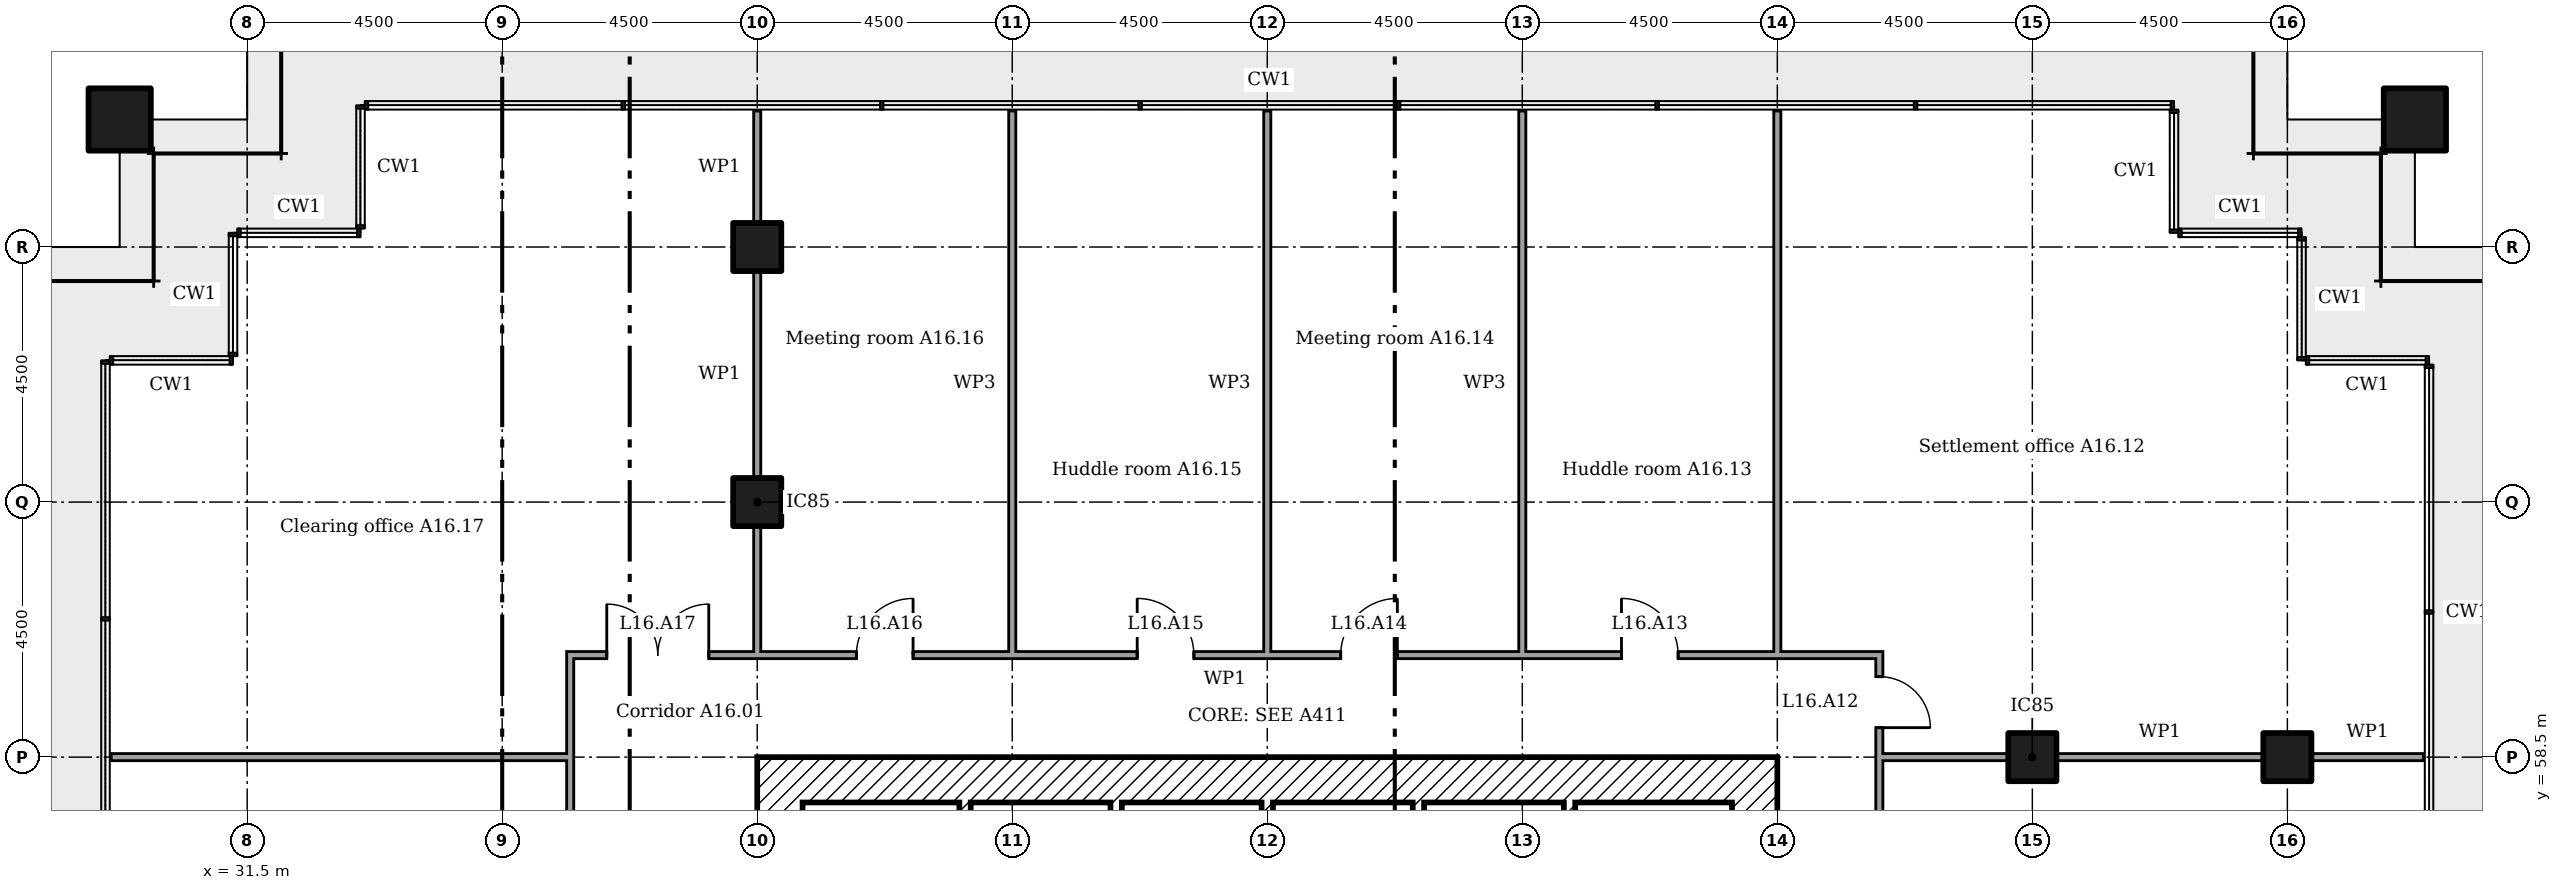
"""IFC4 building model, lengths in metres.
Left out: names, types, materials, properties, quantities, classifications, styles, units other than length and angle.
Written with IfcOpenShell. Run it as: python <this file> out.ifc"""

import sys

from ifc_helpers import new_model, si_unit, direction, frame, frame_2d, origin, origin_2d, place, context, subcontext, project, spatial, rectangle, extrude, element, fill, save


model = new_model("IFC4")
c1 = context("Model", 3, precision=1e-05, world=origin(), true_north=direction((0.0, 1.0)))
c2 = subcontext(c1, "Body", "Model", "MODEL_VIEW")
j1 = project(units=[si_unit("LENGTHUNIT", "METRE"), si_unit("PLANEANGLEUNIT", "RADIAN")], contexts=[c1])
p1 = place(None, origin())
s1 = spatial("IfcSite", under=j1, at=p1, CompositionType="ELEMENT")
p2 = place(p1, origin())
s2 = spatial("IfcBuilding", under=s1, at=p2, CompositionType="ELEMENT")
p3 = place(p2, frame((0.0, 0.0, 69.0)))
s3 = spatial("IfcBuildingStorey", under=s2, at=p3, CompositionType="ELEMENT", Elevation=69.0)
for number, where in (
    (1, (69.75, 69.75, 0.0)),
    (2, (29.25, 69.75, 0.0)),
):
    element("IfcColumn", number, at=place(p3, frame(where)), inside=s3, PredefinedType="COLUMN", context=c2, shape_type="SweptSolid", body=[
        extrude(rectangle(XDim=1.1, YDim=1.1, at=origin_2d()), origin(), (0.0, 0.0, 1.0), 3.6),
    ])
for number, where in (
    (3, (40.5, 63.0, 0.0)),
    (4, (40.5, 67.5, 0.0)),
    (5, (63.0, 58.5, 0.0)),
    (6, (67.5, 58.5, 0.0)),
):
    element("IfcColumn", number, at=place(p3, frame(where)), inside=s3, PredefinedType="COLUMN", context=c2, shape_type="SweptSolid", body=[
        extrude(rectangle(XDim=0.85, YDim=0.85, at=origin_2d()), origin(), (0.0, 0.0, 1.0), 3.6),
    ])
p4 = place(p3, frame((58.1, 40.5, 0.0), z_axis=(0.0, 0.0, 1.0), x_axis=(0.0, 1.0, 0.0)))
e7 = element("IfcWall", 7, at=p4, inside=s3, PredefinedType="SHEAR", context=c2, shape_type="SweptSolid", body=[
    extrude(rectangle(XDim=18.0, YDim=0.8, at=frame_2d((9.0, 0.0))), origin(), (0.0, 0.0, 1.0), 3.35),
])
p5 = place(p4, frame((13.15, 0.0, 0.0)))
e8 = element("IfcOpeningElement", 8, at=p5, cuts=e7, PredefinedType="OPENING", context=c2, shape_type="SweptSolid", body=[
    extrude(rectangle(XDim=1.2, YDim=2.1, at=frame_2d((0.6, 1.05))), frame((0.0, 0.41, 0.0), z_axis=(0.0, -1.0, 0.0), x_axis=(1.0, 0.0, 0.0)), (0.0, 0.0, 1.0), 0.82),
])
p6 = place(p4, frame((3.9, 0.0, 0.0)))
e9 = element("IfcOpeningElement", 9, at=p6, cuts=e7, PredefinedType="OPENING", context=c2, shape_type="SweptSolid", body=[
    extrude(rectangle(XDim=1.8, YDim=2.1, at=frame_2d((0.9, 1.05))), frame((0.0, 0.41, 0.0), z_axis=(0.0, -1.0, 0.0), x_axis=(1.0, 0.0, 0.0)), (0.0, 0.0, 1.0), 0.82),
])
p7 = place(p4, frame((11.525, 0.0, 0.0)))
e10 = element("IfcOpeningElement", 10, at=p7, cuts=e7, PredefinedType="OPENING", context=c2, shape_type="SweptSolid", body=[
    extrude(rectangle(XDim=1.0, YDim=2.1, at=frame_2d((0.5, 1.05))), frame((0.0, 0.41, 0.0), z_axis=(0.0, -1.0, 0.0), x_axis=(1.0, 0.0, 0.0)), (0.0, 0.0, 1.0), 0.82),
])
p8 = place(p3, frame((41.3, 58.1, 0.0)))
e11 = element("IfcWall", 11, at=p8, inside=s3, PredefinedType="SHEAR", context=c2, shape_type="SweptSolid", body=[
    extrude(rectangle(XDim=16.4, YDim=0.8, at=frame_2d((8.2, 0.0))), origin(), (0.0, 0.0, 1.0), 3.35),
])
p9 = place(p3, frame((40.9, 40.5, 0.0), z_axis=(0.0, 0.0, 1.0), x_axis=(0.0, 1.0, 0.0)))
e12 = element("IfcWall", 12, at=p9, inside=s3, PredefinedType="SHEAR", context=c2, shape_type="SweptSolid", body=[
    extrude(rectangle(XDim=18.0, YDim=0.8, at=frame_2d((9.0, 0.0))), origin(), (0.0, 0.0, 1.0), 3.35),
])
p10 = place(p9, frame((3.65, 0.0, 0.0)))
e13 = element("IfcOpeningElement", 13, at=p10, cuts=e12, PredefinedType="OPENING", context=c2, shape_type="SweptSolid", body=[
    extrude(rectangle(XDim=1.2, YDim=2.1, at=frame_2d((0.6, 1.05))), frame((0.0, 0.41, 0.0), z_axis=(0.0, -1.0, 0.0), x_axis=(1.0, 0.0, 0.0)), (0.0, 0.0, 1.0), 0.82),
])
p11 = place(p9, frame((5.475, 0.0, 0.0)))
e14 = element("IfcOpeningElement", 14, at=p11, cuts=e12, PredefinedType="OPENING", context=c2, shape_type="SweptSolid", body=[
    extrude(rectangle(XDim=1.0, YDim=2.1, at=frame_2d((0.5, 1.05))), frame((0.0, 0.41, 0.0), z_axis=(0.0, -1.0, 0.0), x_axis=(1.0, 0.0, 0.0)), (0.0, 0.0, 1.0), 0.82),
])
p12 = place(p9, frame((12.3, 0.0, 0.0)))
e15 = element("IfcOpeningElement", 15, at=p12, cuts=e12, PredefinedType="OPENING", context=c2, shape_type="SweptSolid", body=[
    extrude(rectangle(XDim=1.0, YDim=2.1, at=frame_2d((0.5, 1.05))), frame((0.0, 0.41, 0.0), z_axis=(0.0, -1.0, 0.0), x_axis=(1.0, 0.0, 0.0)), (0.0, 0.0, 1.0), 0.82),
])
p13 = place(p3, frame((44.167, 57.7, 0.0), z_axis=(0.0, 0.0, 1.0), x_axis=(0.0, -1.0, 0.0)))
e16 = element("IfcWall", 16, at=p13, inside=s3, PredefinedType="SHEAR", context=c2, shape_type="SweptSolid", body=[
    extrude(rectangle(XDim=3.3, YDim=0.2, at=frame_2d((1.65, 0.0))), origin(), (0.0, 0.0, 1.0), 3.35),
])
p14 = place(p3, frame((46.833, 57.7, 0.0), z_axis=(0.0, 0.0, 1.0), x_axis=(0.0, -1.0, 0.0)))
e17 = element("IfcWall", 17, at=p14, inside=s3, PredefinedType="SHEAR", context=c2, shape_type="SweptSolid", body=[
    extrude(rectangle(XDim=4.4, YDim=0.2, at=frame_2d((2.2, 0.0))), origin(), (0.0, 0.0, 1.0), 3.35),
])
for number, where, z_axis, x_axis in (
    (18, (49.5, 57.7, 0.0), (0.0, 0.0, 1.0), (0.0, -1.0, 0.0)),
    (19, (52.167, 57.7, 0.0), (0.0, 0.0, 1.0), (0.0, -1.0, 0.0)),
    (20, (54.833, 57.7, 0.0), (0.0, 0.0, 1.0), (0.0, -1.0, 0.0)),
):
    element("IfcWall", number, at=place(p3, frame(where, z_axis=z_axis, x_axis=x_axis)), inside=s3, PredefinedType="SHEAR", context=c2, shape_type="SweptSolid", body=[
        extrude(rectangle(XDim=2.5, YDim=0.2, at=frame_2d((1.25, 0.0))), origin(), (0.0, 0.0, 1.0), 3.35),
    ])
p15 = place(p3, frame((29.1, 58.5, 0.0)))
e21 = element("IfcWall", 21, at=p15, inside=s3, PredefinedType="PARTITIONING", context=c2, shape_type="SweptSolid", body=[
    extrude(rectangle(XDim=8.1, YDim=0.125, at=frame_2d((4.05, 0.0))), origin(), (0.0, 0.0, 1.0), 2.766),
])
p16 = place(p3, frame((60.3, 58.5, 0.0)))
e22 = element("IfcWall", 22, at=p16, inside=s3, PredefinedType="PARTITIONING", context=c2, shape_type="SweptSolid", body=[
    extrude(rectangle(XDim=2.275, YDim=0.125, at=frame_2d((1.137, 0.0))), origin(), (0.0, 0.0, 1.0), 2.676),
])
p17 = place(p3, frame((63.425, 58.5, 0.0)))
e23 = element("IfcWall", 23, at=p17, inside=s3, PredefinedType="PARTITIONING", context=c2, shape_type="SweptSolid", body=[
    extrude(rectangle(XDim=3.65, YDim=0.125, at=frame_2d((1.825, 0.0))), origin(), (0.0, 0.0, 1.0), 2.676),
])
p18 = place(p3, frame((67.925, 58.5, 0.0)))
e24 = element("IfcWall", 24, at=p18, inside=s3, PredefinedType="PARTITIONING", context=c2, shape_type="SweptSolid", body=[
    extrude(rectangle(XDim=1.975, YDim=0.125, at=frame_2d((0.987, 0.0))), origin(), (0.0, 0.0, 1.0), 2.676),
])
p19 = place(p3, frame((37.137, 60.3, 0.0)))
e25 = element("IfcWall", 25, at=p19, inside=s3, PredefinedType="PARTITIONING", context=c2, shape_type="SweptSolid", body=[
    extrude(rectangle(XDim=23.225, YDim=0.125, at=frame_2d((11.613, 0.0))), origin(), (0.0, 0.0, 1.0), 3.45),
])
p20 = place(p19, frame((18.613, 0.0, 0.0)))
e26 = element("IfcOpeningElement", 26, at=p20, cuts=e25, PredefinedType="OPENING", context=c2, shape_type="SweptSolid", body=[
    extrude(rectangle(XDim=1.0, YDim=2.1, at=frame_2d((0.5, 1.05))), frame((0.0, 0.073, 0.0), z_axis=(0.0, -1.0, 0.0), x_axis=(1.0, 0.0, 0.0)), (0.0, 0.0, 1.0), 0.145),
])
p21 = place(p19, frame((13.657, 0.0, 0.0)))
e27 = element("IfcOpeningElement", 27, at=p21, cuts=e25, PredefinedType="OPENING", context=c2, shape_type="SweptSolid", body=[
    extrude(rectangle(XDim=1.0, YDim=2.1, at=frame_2d((0.5, 1.05))), frame((0.0, 0.073, 0.0), z_axis=(0.0, -1.0, 0.0), x_axis=(1.0, 0.0, 0.0)), (0.0, 0.0, 1.0), 0.145),
])
p22 = place(p19, frame((10.067, 0.0, 0.0)))
e28 = element("IfcOpeningElement", 28, at=p22, cuts=e25, PredefinedType="OPENING", context=c2, shape_type="SweptSolid", body=[
    extrude(rectangle(XDim=1.0, YDim=2.1, at=frame_2d((0.5, 1.05))), frame((0.0, 0.073, 0.0), z_axis=(0.0, -1.0, 0.0), x_axis=(1.0, 0.0, 0.0)), (0.0, 0.0, 1.0), 0.145),
])
p23 = place(p19, frame((5.113, 0.0, 0.0)))
e29 = element("IfcOpeningElement", 29, at=p23, cuts=e25, PredefinedType="OPENING", context=c2, shape_type="SweptSolid", body=[
    extrude(rectangle(XDim=1.0, YDim=2.1, at=frame_2d((0.5, 1.05))), frame((0.0, 0.073, 0.0), z_axis=(0.0, -1.0, 0.0), x_axis=(1.0, 0.0, 0.0)), (0.0, 0.0, 1.0), 0.145),
])
p24 = place(p19, frame((0.708, 0.0, 0.0)))
e30 = element("IfcOpeningElement", 30, at=p24, cuts=e25, PredefinedType="OPENING", context=c2, shape_type="SweptSolid", body=[
    extrude(rectangle(XDim=1.8, YDim=2.1, at=frame_2d((0.9, 1.05))), frame((0.0, 0.073, 0.0), z_axis=(0.0, -1.0, 0.0), x_axis=(1.0, 0.0, 0.0)), (0.0, 0.0, 1.0), 0.145),
])
p25 = place(p3, frame((37.2, 38.762, 0.0), z_axis=(0.0, 0.0, 1.0), x_axis=(0.0, 1.0, 0.0)))
e31 = element("IfcWall", 31, at=p25, inside=s3, PredefinedType="PARTITIONING", context=c2, shape_type="SweptSolid", body=[
    extrude(rectangle(XDim=21.475, YDim=0.125, at=frame_2d((10.738, 0.0))), origin(), (0.0, 0.0, 1.0), 3.45),
])
p26 = place(p25, frame((7.988, 0.0, 0.0)))
e32 = element("IfcOpeningElement", 32, at=p26, cuts=e31, PredefinedType="OPENING", context=c2, shape_type="SweptSolid", body=[
    extrude(rectangle(XDim=1.0, YDim=2.1, at=frame_2d((0.5, 1.05))), frame((0.0, 0.073, 0.0), z_axis=(0.0, -1.0, 0.0), x_axis=(1.0, 0.0, 0.0)), (0.0, 0.0, 1.0), 0.145),
])
p27 = place(p25, frame((3.032, 0.0, 0.0)))
e33 = element("IfcOpeningElement", 33, at=p27, cuts=e31, PredefinedType="OPENING", context=c2, shape_type="SweptSolid", body=[
    extrude(rectangle(XDim=1.0, YDim=2.1, at=frame_2d((0.5, 1.05))), frame((0.0, 0.073, 0.0), z_axis=(0.0, -1.0, 0.0), x_axis=(1.0, 0.0, 0.0)), (0.0, 0.0, 1.0), 0.145),
])
p28 = place(p25, frame((17.442, 0.0, 0.0)))
e34 = element("IfcOpeningElement", 34, at=p28, cuts=e31, PredefinedType="OPENING", context=c2, shape_type="SweptSolid", body=[
    extrude(rectangle(XDim=1.0, YDim=2.1, at=frame_2d((0.5, 1.05))), frame((0.0, 0.073, 0.0), z_axis=(0.0, -1.0, 0.0), x_axis=(1.0, 0.0, 0.0)), (0.0, 0.0, 1.0), 0.145),
])
p29 = place(p25, frame((12.488, 0.0, 0.0)))
e35 = element("IfcOpeningElement", 35, at=p29, cuts=e31, PredefinedType="OPENING", context=c2, shape_type="SweptSolid", body=[
    extrude(rectangle(XDim=1.0, YDim=2.1, at=frame_2d((0.5, 1.05))), frame((0.0, 0.073, 0.0), z_axis=(0.0, -1.0, 0.0), x_axis=(1.0, 0.0, 0.0)), (0.0, 0.0, 1.0), 0.145),
])
p30 = place(p3, frame((40.5, 60.3, 0.0), z_axis=(0.0, 0.0, 1.0), x_axis=(0.0, 1.0, 0.0)))
e36 = element("IfcWall", 36, at=p30, inside=s3, PredefinedType="PARTITIONING", context=c2, shape_type="SweptSolid", body=[
    extrude(rectangle(XDim=2.275, YDim=0.125, at=frame_2d((1.137, 0.0))), origin(), (0.0, 0.0, 1.0), 2.676),
])
p31 = place(p3, frame((40.5, 63.425, 0.0), z_axis=(0.0, 0.0, 1.0), x_axis=(0.0, 1.0, 0.0)))
e37 = element("IfcWall", 37, at=p31, inside=s3, PredefinedType="PARTITIONING", context=c2, shape_type="SweptSolid", body=[
    extrude(rectangle(XDim=3.65, YDim=0.125, at=frame_2d((1.825, 0.0))), origin(), (0.0, 0.0, 1.0), 2.676),
])
p32 = place(p3, frame((40.5, 67.925, 0.0), z_axis=(0.0, 0.0, 1.0), x_axis=(0.0, 1.0, 0.0)))
e38 = element("IfcWall", 38, at=p32, inside=s3, PredefinedType="PARTITIONING", context=c2, shape_type="SweptSolid", body=[
    extrude(rectangle(XDim=1.975, YDim=0.125, at=frame_2d((0.987, 0.0))), origin(), (0.0, 0.0, 1.0), 2.676),
])
for number, where, z_axis, x_axis in (
    (39, (45.0, 60.3, 0.0), (0.0, 0.0, 1.0), (0.0, 1.0, 0.0)),
    (40, (49.5, 60.3, 0.0), (0.0, 0.0, 1.0), (0.0, 1.0, 0.0)),
    (41, (54.0, 60.3, 0.0), (0.0, 0.0, 1.0), (0.0, 1.0, 0.0)),
):
    element("IfcWall", number, at=place(p3, frame(where, z_axis=z_axis, x_axis=x_axis)), inside=s3, PredefinedType="MOVABLE", context=c2, shape_type="SweptSolid", body=[
        extrude(rectangle(XDim=9.6, YDim=0.125, at=frame_2d((4.8, 0.0))), origin(), (0.0, 0.0, 1.0), 2.766),
    ])
p33 = place(p3, frame((58.5, 60.3, 0.0), z_axis=(0.0, 0.0, 1.0), x_axis=(0.0, 1.0, 0.0)))
e42 = element("IfcWall", 42, at=p33, inside=s3, PredefinedType="PARTITIONING", context=c2, shape_type="SweptSolid", body=[
    extrude(rectangle(XDim=9.6, YDim=0.125, at=frame_2d((4.8, 0.0))), origin(), (0.0, 0.0, 1.0), 2.766),
])
p34 = place(p3, frame((60.3, 38.762, 0.0), z_axis=(0.0, 0.0, 1.0), x_axis=(0.0, 1.0, 0.0)))
e43 = element("IfcWall", 43, at=p34, inside=s3, PredefinedType="PARTITIONING", context=c2, shape_type="SweptSolid", body=[
    extrude(rectangle(XDim=21.475, YDim=0.125, at=frame_2d((10.738, 0.0))), origin(), (0.0, 0.0, 1.0), 3.45),
])
p35 = place(p34, frame((3.032, 0.0, 0.0)))
e44 = element("IfcOpeningElement", 44, at=p35, cuts=e43, PredefinedType="OPENING", context=c2, shape_type="SweptSolid", body=[
    extrude(rectangle(XDim=1.0, YDim=2.1, at=frame_2d((0.5, 1.05))), frame((0.0, 0.073, 0.0), z_axis=(0.0, -1.0, 0.0), x_axis=(1.0, 0.0, 0.0)), (0.0, 0.0, 1.0), 0.145),
])
p36 = place(p34, frame((8.442, 0.0, 0.0)))
e45 = element("IfcOpeningElement", 45, at=p36, cuts=e43, PredefinedType="OPENING", context=c2, shape_type="SweptSolid", body=[
    extrude(rectangle(XDim=1.0, YDim=2.1, at=frame_2d((0.5, 1.05))), frame((0.0, 0.073, 0.0), z_axis=(0.0, -1.0, 0.0), x_axis=(1.0, 0.0, 0.0)), (0.0, 0.0, 1.0), 0.145),
])
p37 = place(p34, frame((12.488, 0.0, 0.0)))
e46 = element("IfcOpeningElement", 46, at=p37, cuts=e43, PredefinedType="OPENING", context=c2, shape_type="SweptSolid", body=[
    extrude(rectangle(XDim=1.0, YDim=2.1, at=frame_2d((0.5, 1.05))), frame((0.0, 0.073, 0.0), z_axis=(0.0, -1.0, 0.0), x_axis=(1.0, 0.0, 0.0)), (0.0, 0.0, 1.0), 0.145),
])
p38 = place(p34, frame((16.532, 0.0, 0.0)))
e47 = element("IfcOpeningElement", 47, at=p38, cuts=e43, PredefinedType="OPENING", context=c2, shape_type="SweptSolid", body=[
    extrude(rectangle(XDim=1.0, YDim=2.1, at=frame_2d((0.5, 1.05))), frame((0.0, 0.073, 0.0), z_axis=(0.0, -1.0, 0.0), x_axis=(1.0, 0.0, 0.0)), (0.0, 0.0, 1.0), 0.145),
])
p39 = place(p34, frame((20.258, 0.0, 0.0)))
e48 = element("IfcOpeningElement", 48, at=p39, cuts=e43, PredefinedType="OPENING", context=c2, shape_type="SweptSolid", body=[
    extrude(rectangle(XDim=0.9, YDim=2.1, at=frame_2d((0.45, 1.05))), frame((0.0, 0.073, 0.0), z_axis=(0.0, -1.0, 0.0), x_axis=(1.0, 0.0, 0.0)), (0.0, 0.0, 1.0), 0.145),
])
p40 = place(p39, frame((0.9, 0.0, 0.0), x_axis=(-1.0, 0.0, 0.0)))
e49 = element("IfcDoor", 49, at=p40, inside=s3, OperationType="SINGLE_SWING_LEFT", PredefinedType="DOOR", context=c2, shape_type="SweptSolid", body=[
    extrude(rectangle(XDim=0.9, YDim=2.1, at=frame_2d((0.45, 1.05))), frame((0.0, 0.025, 0.0), z_axis=(0.0, -1.0, 0.0), x_axis=(1.0, 0.0, 0.0)), (0.0, 0.0, 1.0), 0.05),
])
fill(e48, e49)
p41 = place(p20, origin())
e50 = element("IfcDoor", 50, at=p41, inside=s3, OperationType="SINGLE_SWING_RIGHT", PredefinedType="DOOR", context=c2, shape_type="SweptSolid", body=[
    extrude(rectangle(XDim=1.0, YDim=2.1, at=frame_2d((0.5, 1.05))), frame((0.0, 0.025, 0.0), z_axis=(0.0, -1.0, 0.0), x_axis=(1.0, 0.0, 0.0)), (0.0, 0.0, 1.0), 0.05),
])
fill(e26, e50)
p42 = place(p21, origin())
e51 = element("IfcDoor", 51, at=p42, inside=s3, OperationType="SINGLE_SWING_LEFT", PredefinedType="DOOR", context=c2, shape_type="SweptSolid", body=[
    extrude(rectangle(XDim=1.0, YDim=2.1, at=frame_2d((0.5, 1.05))), frame((0.0, 0.025, 0.0), z_axis=(0.0, -1.0, 0.0), x_axis=(1.0, 0.0, 0.0)), (0.0, 0.0, 1.0), 0.05),
])
fill(e27, e51)
p43 = place(p22, origin())
e52 = element("IfcDoor", 52, at=p43, inside=s3, OperationType="SINGLE_SWING_RIGHT", PredefinedType="DOOR", context=c2, shape_type="SweptSolid", body=[
    extrude(rectangle(XDim=1.0, YDim=2.1, at=frame_2d((0.5, 1.05))), frame((0.0, 0.025, 0.0), z_axis=(0.0, -1.0, 0.0), x_axis=(1.0, 0.0, 0.0)), (0.0, 0.0, 1.0), 0.05),
])
fill(e28, e52)
p44 = place(p23, origin())
e53 = element("IfcDoor", 53, at=p44, inside=s3, OperationType="SINGLE_SWING_LEFT", PredefinedType="DOOR", context=c2, shape_type="SweptSolid", body=[
    extrude(rectangle(XDim=1.0, YDim=2.1, at=frame_2d((0.5, 1.05))), frame((0.0, 0.025, 0.0), z_axis=(0.0, -1.0, 0.0), x_axis=(1.0, 0.0, 0.0)), (0.0, 0.0, 1.0), 0.05),
])
fill(e29, e53)
p45 = place(p24, origin())
e54 = element("IfcDoor", 54, at=p45, inside=s3, OperationType="DOUBLE_DOOR_SINGLE_SWING", PredefinedType="DOOR", context=c2, shape_type="SweptSolid", body=[
    extrude(rectangle(XDim=1.8, YDim=2.1, at=frame_2d((0.9, 1.05))), frame((0.0, 0.025, 0.0), z_axis=(0.0, -1.0, 0.0), x_axis=(1.0, 0.0, 0.0)), (0.0, 0.0, 1.0), 0.05),
])
fill(e30, e54)
save(model, sys.argv[1])
